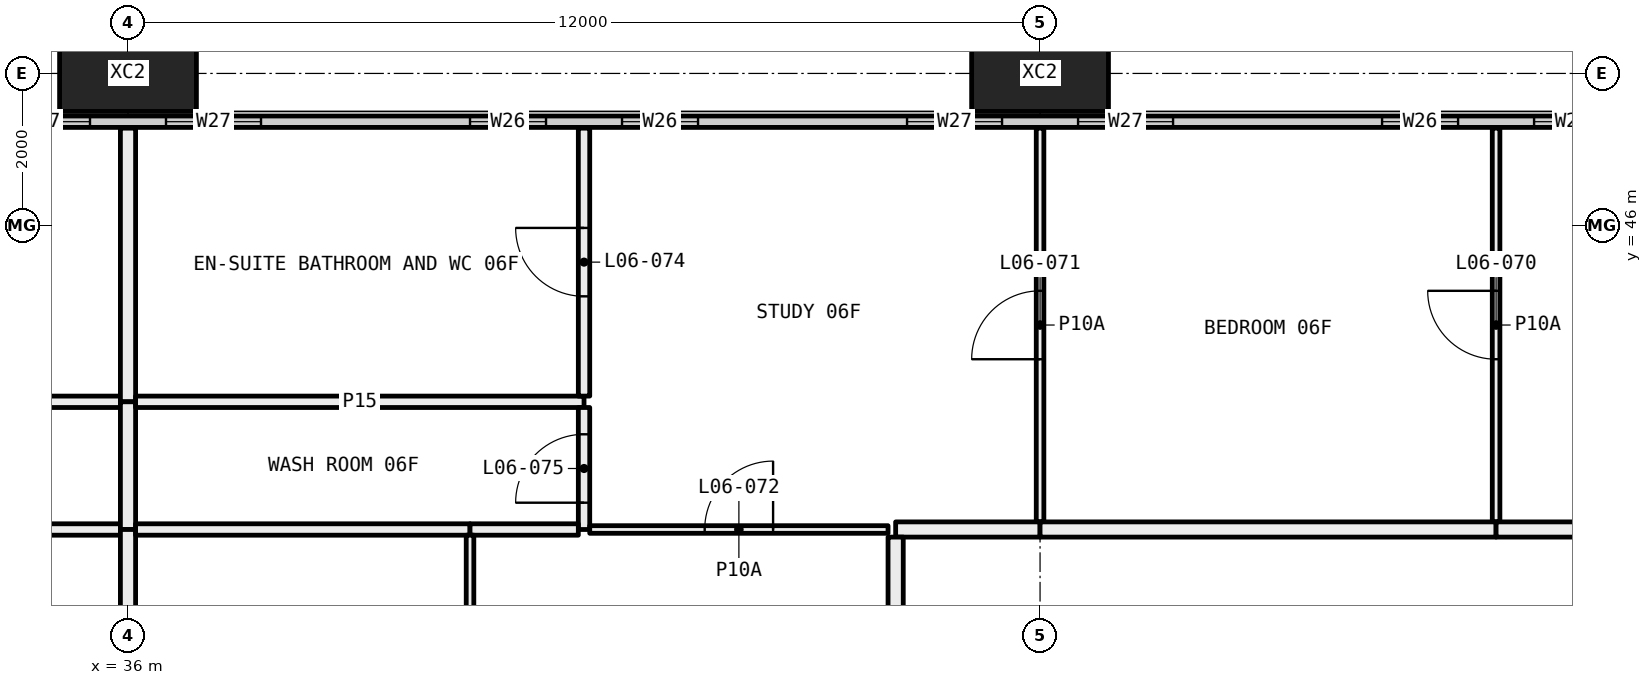
"""IFC4 building model, lengths in metres.
Left out: names, types, materials, properties, quantities, classifications, styles, units other than length and angle.
Written with IfcOpenShell. Run it as: python <this file> out.ifc"""

import sys

from ifc_helpers import new_model, si_unit, direction, frame, frame_2d, origin, origin_2d, place, context, subcontext, project, spatial, rectangle, hollow_rectangle, extrude, element, fill, save


model = new_model("IFC4")
c1 = context("Model", 3, precision=1e-05, world=origin(), true_north=direction((0.0, 1.0)))
c2 = subcontext(c1, "Body", "Model", "MODEL_VIEW")
j1 = project(units=[si_unit("LENGTHUNIT", "METRE"), si_unit("PLANEANGLEUNIT", "RADIAN")], contexts=[c1])
p1 = place(None, origin())
s1 = spatial("IfcSite", under=j1, at=p1, CompositionType="ELEMENT")
p2 = place(p1, origin())
s2 = spatial("IfcBuilding", under=s1, at=p2, CompositionType="ELEMENT")
p3 = place(p2, frame((0.0, 0.0, 33.45)))
s3 = spatial("IfcBuildingStorey", under=s2, at=p3, CompositionType="ELEMENT", Elevation=33.45)
for number, where, z_axis, x_axis in (
    (1, (36.0, 48.0, -0.4), (0.0, 0.0, 1.0), (1.0, 0.0, 0.0)),
    (2, (48.0, 48.0, -0.4), (0.0, 0.0, 1.0), (1.0, 0.0, 0.0)),
):
    element("IfcColumn", number, at=place(p3, frame(where, z_axis=z_axis, x_axis=x_axis)), inside=s3, PredefinedType="COLUMN", context=c2, shape_type="SweptSolid", body=[
        extrude(hollow_rectangle(XDim=1.8, YDim=1.0, WallThickness=0.07, at=origin_2d()), origin(), (0.0, 0.0, 1.0), 3.45),
    ])
p4 = place(p3, frame((6.56, 47.365, 0.0), z_axis=(0.0, 0.0, 1.0), x_axis=(1.0, 0.0, 0.0)))
e3 = element("IfcWall", 3, at=p4, inside=s3, PredefinedType="ELEMENTEDWALL", context=c2, shape_type="SweptSolid", body=[
    extrude(rectangle(XDim=58.88, YDim=0.15, at=frame_2d((29.44, 0.0))), origin(), (0.0, 0.0, 1.0), 3.05),
])
p5 = place(p4, frame((0.44, 0.0, 0.45)))
e4 = element("IfcOpeningElement", 4, at=p5, cuts=e3, PredefinedType="OPENING", context=c2, shape_type="SweptSolid", body=[
    extrude(rectangle(XDim=4.5, YDim=2.55, at=frame_2d((2.25, 1.275))), frame((0.0, 0.085, 0.0), z_axis=(0.0, -1.0, 0.0), x_axis=(1.0, 0.0, 0.0)), (0.0, 0.0, 1.0), 0.17),
])
p6 = place(p4, frame((5.94, 0.0, 0.45)))
e5 = element("IfcOpeningElement", 5, at=p6, cuts=e3, PredefinedType="OPENING", context=c2, shape_type="SweptSolid", body=[
    extrude(rectangle(XDim=1.25, YDim=2.55, at=frame_2d((0.625, 1.275))), frame((0.0, 0.085, 0.0), z_axis=(0.0, -1.0, 0.0), x_axis=(1.0, 0.0, 0.0)), (0.0, 0.0, 1.0), 0.17),
])
p7 = place(p4, frame((9.94, 0.0, 0.45)))
e6 = element("IfcOpeningElement", 6, at=p7, cuts=e3, PredefinedType="OPENING", context=c2, shape_type="SweptSolid", body=[
    extrude(rectangle(XDim=1.0, YDim=2.55, at=frame_2d((0.5, 1.275))), frame((0.0, 0.085, 0.0), z_axis=(0.0, -1.0, 0.0), x_axis=(1.0, 0.0, 0.0)), (0.0, 0.0, 1.0), 0.17),
])
p8 = place(p4, frame((11.94, 0.0, 0.45)))
e7 = element("IfcOpeningElement", 7, at=p8, cuts=e3, PredefinedType="OPENING", context=c2, shape_type="SweptSolid", body=[
    extrude(rectangle(XDim=1.0, YDim=2.55, at=frame_2d((0.5, 1.275))), frame((0.0, 0.085, 0.0), z_axis=(0.0, -1.0, 0.0), x_axis=(1.0, 0.0, 0.0)), (0.0, 0.0, 1.0), 0.17),
])
p9 = place(p4, frame((15.69, 0.0, 0.45)))
e8 = element("IfcOpeningElement", 8, at=p9, cuts=e3, PredefinedType="OPENING", context=c2, shape_type="SweptSolid", body=[
    extrude(rectangle(XDim=1.25, YDim=2.55, at=frame_2d((0.625, 1.275))), frame((0.0, 0.085, 0.0), z_axis=(0.0, -1.0, 0.0), x_axis=(1.0, 0.0, 0.0)), (0.0, 0.0, 1.0), 0.17),
])
p10 = place(p4, frame((17.94, 0.0, 0.45)))
e9 = element("IfcOpeningElement", 9, at=p10, cuts=e3, PredefinedType="OPENING", context=c2, shape_type="SweptSolid", body=[
    extrude(rectangle(XDim=1.25, YDim=2.55, at=frame_2d((0.625, 1.275))), frame((0.0, 0.085, 0.0), z_axis=(0.0, -1.0, 0.0), x_axis=(1.0, 0.0, 0.0)), (0.0, 0.0, 1.0), 0.17),
])
p11 = place(p4, frame((21.94, 0.0, 0.45)))
e10 = element("IfcOpeningElement", 10, at=p11, cuts=e3, PredefinedType="OPENING", context=c2, shape_type="SweptSolid", body=[
    extrude(rectangle(XDim=1.0, YDim=2.55, at=frame_2d((0.5, 1.275))), frame((0.0, 0.085, 0.0), z_axis=(0.0, -1.0, 0.0), x_axis=(1.0, 0.0, 0.0)), (0.0, 0.0, 1.0), 0.17),
])
p12 = place(p4, frame((23.94, 0.0, 0.45)))
e11 = element("IfcOpeningElement", 11, at=p12, cuts=e3, PredefinedType="OPENING", context=c2, shape_type="SweptSolid", body=[
    extrude(rectangle(XDim=1.0, YDim=2.55, at=frame_2d((0.5, 1.275))), frame((0.0, 0.085, 0.0), z_axis=(0.0, -1.0, 0.0), x_axis=(1.0, 0.0, 0.0)), (0.0, 0.0, 1.0), 0.17),
])
p13 = place(p4, frame((27.69, 0.0, 0.45)))
e12 = element("IfcOpeningElement", 12, at=p13, cuts=e3, PredefinedType="OPENING", context=c2, shape_type="SweptSolid", body=[
    extrude(rectangle(XDim=1.25, YDim=2.55, at=frame_2d((0.625, 1.275))), frame((0.0, 0.085, 0.0), z_axis=(0.0, -1.0, 0.0), x_axis=(1.0, 0.0, 0.0)), (0.0, 0.0, 1.0), 0.17),
])
p14 = place(p4, frame((29.94, 0.0, 0.45)))
e13 = element("IfcOpeningElement", 13, at=p14, cuts=e3, PredefinedType="OPENING", context=c2, shape_type="SweptSolid", body=[
    extrude(rectangle(XDim=1.25, YDim=2.55, at=frame_2d((0.625, 1.275))), frame((0.0, 0.085, 0.0), z_axis=(0.0, -1.0, 0.0), x_axis=(1.0, 0.0, 0.0)), (0.0, 0.0, 1.0), 0.17),
])
p15 = place(p4, frame((33.94, 0.0, 0.45)))
e14 = element("IfcOpeningElement", 14, at=p15, cuts=e3, PredefinedType="OPENING", context=c2, shape_type="SweptSolid", body=[
    extrude(rectangle(XDim=1.0, YDim=2.55, at=frame_2d((0.5, 1.275))), frame((0.0, 0.085, 0.0), z_axis=(0.0, -1.0, 0.0), x_axis=(1.0, 0.0, 0.0)), (0.0, 0.0, 1.0), 0.17),
])
p16 = place(p4, frame((35.94, 0.0, 0.45)))
e15 = element("IfcOpeningElement", 15, at=p16, cuts=e3, PredefinedType="OPENING", context=c2, shape_type="SweptSolid", body=[
    extrude(rectangle(XDim=1.0, YDim=2.55, at=frame_2d((0.5, 1.275))), frame((0.0, 0.085, 0.0), z_axis=(0.0, -1.0, 0.0), x_axis=(1.0, 0.0, 0.0)), (0.0, 0.0, 1.0), 0.17),
])
p17 = place(p4, frame((39.69, 0.0, 0.45)))
e16 = element("IfcOpeningElement", 16, at=p17, cuts=e3, PredefinedType="OPENING", context=c2, shape_type="SweptSolid", body=[
    extrude(rectangle(XDim=1.25, YDim=2.55, at=frame_2d((0.625, 1.275))), frame((0.0, 0.085, 0.0), z_axis=(0.0, -1.0, 0.0), x_axis=(1.0, 0.0, 0.0)), (0.0, 0.0, 1.0), 0.17),
])
p18 = place(p4, frame((41.94, 0.0, 0.45)))
e17 = element("IfcOpeningElement", 17, at=p18, cuts=e3, PredefinedType="OPENING", context=c2, shape_type="SweptSolid", body=[
    extrude(rectangle(XDim=1.25, YDim=2.55, at=frame_2d((0.625, 1.275))), frame((0.0, 0.085, 0.0), z_axis=(0.0, -1.0, 0.0), x_axis=(1.0, 0.0, 0.0)), (0.0, 0.0, 1.0), 0.17),
])
p19 = place(p4, frame((45.94, 0.0, 0.45)))
e18 = element("IfcOpeningElement", 18, at=p19, cuts=e3, PredefinedType="OPENING", context=c2, shape_type="SweptSolid", body=[
    extrude(rectangle(XDim=1.0, YDim=2.55, at=frame_2d((0.5, 1.275))), frame((0.0, 0.085, 0.0), z_axis=(0.0, -1.0, 0.0), x_axis=(1.0, 0.0, 0.0)), (0.0, 0.0, 1.0), 0.17),
])
p20 = place(p4, frame((47.94, 0.0, 0.45)))
e19 = element("IfcOpeningElement", 19, at=p20, cuts=e3, PredefinedType="OPENING", context=c2, shape_type="SweptSolid", body=[
    extrude(rectangle(XDim=1.0, YDim=2.55, at=frame_2d((0.5, 1.275))), frame((0.0, 0.085, 0.0), z_axis=(0.0, -1.0, 0.0), x_axis=(1.0, 0.0, 0.0)), (0.0, 0.0, 1.0), 0.17),
])
p21 = place(p4, frame((51.69, 0.0, 0.45)))
e20 = element("IfcOpeningElement", 20, at=p21, cuts=e3, PredefinedType="OPENING", context=c2, shape_type="SweptSolid", body=[
    extrude(rectangle(XDim=1.25, YDim=2.55, at=frame_2d((0.625, 1.275))), frame((0.0, 0.085, 0.0), z_axis=(0.0, -1.0, 0.0), x_axis=(1.0, 0.0, 0.0)), (0.0, 0.0, 1.0), 0.17),
])
p22 = place(p4, frame((53.94, 0.0, 0.45)))
e21 = element("IfcOpeningElement", 21, at=p22, cuts=e3, PredefinedType="OPENING", context=c2, shape_type="SweptSolid", body=[
    extrude(rectangle(XDim=4.5, YDim=2.55, at=frame_2d((2.25, 1.275))), frame((0.0, 0.085, 0.0), z_axis=(0.0, -1.0, 0.0), x_axis=(1.0, 0.0, 0.0)), (0.0, 0.0, 1.0), 0.17),
])
p23 = place(p3, frame((30.075, 43.68, 0.0), z_axis=(0.0, 0.0, 1.0), x_axis=(1.0, 0.0, 0.0)))
e22 = element("IfcWall", 22, at=p23, inside=s3, PredefinedType="PARTITIONING", context=c2, shape_type="SweptSolid", body=[
    extrude(rectangle(XDim=5.825, YDim=0.15, at=frame_2d((2.913, 0.0))), origin(), (0.0, 0.0, 1.0), 3.05),
])
p24 = place(p3, frame((36.0, 43.68, 0.0), z_axis=(0.0, 0.0, 1.0), x_axis=(0.0, 1.0, 0.0)))
e23 = element("IfcWall", 23, at=p24, inside=s3, PredefinedType="PARTITIONING", context=c2, shape_type="SweptSolid", body=[
    extrude(rectangle(XDim=3.6, YDim=0.2, at=frame_2d((1.8, 0.0))), origin(), (0.0, 0.0, 1.0), 2.45),
])
p25 = place(p3, frame((31.5, 42.0, 0.0), z_axis=(0.0, 0.0, 1.0), x_axis=(1.0, 0.0, 0.0)))
e24 = element("IfcWall", 24, at=p25, inside=s3, PredefinedType="PARTITIONING", context=c2, shape_type="SweptSolid", body=[
    extrude(rectangle(XDim=4.4, YDim=0.15, at=frame_2d((2.2, 0.0))), origin(), (0.0, 0.0, 1.0), 3.05),
])
p26 = place(p3, frame((36.0, 42.0, 0.0), z_axis=(0.0, 0.0, 1.0), x_axis=(0.0, 1.0, 0.0)))
e25 = element("IfcWall", 25, at=p26, inside=s3, PredefinedType="PARTITIONING", context=c2, shape_type="SweptSolid", body=[
    extrude(rectangle(XDim=1.68, YDim=0.2, at=frame_2d((0.84, 0.0))), origin(), (0.0, 0.0, 1.0), 2.45),
])
p27 = place(p3, frame((36.0, 36.8, 0.0), z_axis=(0.0, 0.0, 1.0), x_axis=(0.0, 1.0, 0.0)))
e26 = element("IfcWall", 26, at=p27, inside=s3, PredefinedType="PARTITIONING", context=c2, shape_type="SweptSolid", body=[
    extrude(rectangle(XDim=5.2, YDim=0.2, at=frame_2d((2.6, 0.0))), origin(), (0.0, 0.0, 1.0), 2.45),
])
p28 = place(p3, frame((36.1, 43.68, 0.0), z_axis=(0.0, 0.0, 1.0), x_axis=(1.0, 0.0, 0.0)))
e27 = element("IfcWall", 27, at=p28, inside=s3, PredefinedType="PARTITIONING", context=c2, shape_type="SweptSolid", body=[
    extrude(rectangle(XDim=5.9, YDim=0.15, at=frame_2d((2.95, 0.0))), origin(), (0.0, 0.0, 1.0), 3.05),
])
p29 = place(p3, frame((42.0, 43.755, 0.0), z_axis=(0.0, 0.0, 1.0), x_axis=(0.0, 1.0, 0.0)))
e28 = element("IfcWall", 28, at=p29, inside=s3, PredefinedType="PARTITIONING", context=c2, shape_type="SweptSolid", body=[
    extrude(rectangle(XDim=3.525, YDim=0.15, at=frame_2d((1.763, 0.0))), origin(), (0.0, 0.0, 1.0), 3.05),
])
p30 = place(p29, frame((1.312, 0.0, 0.0)))
e29 = element("IfcOpeningElement", 29, at=p30, cuts=e28, PredefinedType="OPENING", context=c2, shape_type="SweptSolid", body=[
    extrude(rectangle(XDim=0.9, YDim=2.1, at=frame_2d((0.45, 1.05))), frame((0.0, 0.085, 0.0), z_axis=(0.0, -1.0, 0.0), x_axis=(1.0, 0.0, 0.0)), (0.0, 0.0, 1.0), 0.17),
])
p31 = place(p3, frame((42.0, 42.0, 0.0), z_axis=(0.0, 0.0, 1.0), x_axis=(0.0, 1.0, 0.0)))
e30 = element("IfcWall", 30, at=p31, inside=s3, PredefinedType="PARTITIONING", context=c2, shape_type="SweptSolid", body=[
    extrude(rectangle(XDim=1.605, YDim=0.15, at=frame_2d((0.802, 0.0))), origin(), (0.0, 0.0, 1.0), 3.05),
])
p32 = place(p31, frame((0.353, 0.0, 0.0)))
e31 = element("IfcOpeningElement", 31, at=p32, cuts=e30, PredefinedType="OPENING", context=c2, shape_type="SweptSolid", body=[
    extrude(rectangle(XDim=0.9, YDim=2.1, at=frame_2d((0.45, 1.05))), frame((0.0, 0.085, 0.0), z_axis=(0.0, -1.0, 0.0), x_axis=(1.0, 0.0, 0.0)), (0.0, 0.0, 1.0), 0.17),
])
p33 = place(p3, frame((36.1, 42.0, 0.0), z_axis=(0.0, 0.0, 1.0), x_axis=(1.0, 0.0, 0.0)))
e32 = element("IfcWall", 32, at=p33, inside=s3, PredefinedType="PARTITIONING", context=c2, shape_type="SweptSolid", body=[
    extrude(rectangle(XDim=4.4, YDim=0.15, at=frame_2d((2.2, 0.0))), origin(), (0.0, 0.0, 1.0), 3.05),
])
p34 = place(p3, frame((40.5, 42.0, 0.0), z_axis=(0.0, 0.0, 1.0), x_axis=(1.0, 0.0, 0.0)))
e33 = element("IfcWall", 33, at=p34, inside=s3, PredefinedType="PARTITIONING", context=c2, shape_type="SweptSolid", body=[
    extrude(rectangle(XDim=1.425, YDim=0.15, at=frame_2d((0.712, 0.0))), origin(), (0.0, 0.0, 1.0), 3.05),
])
p35 = place(p3, frame((48.0, 42.1, 0.0), z_axis=(0.0, 0.0, 1.0), x_axis=(0.0, 1.0, 0.0)))
e34 = element("IfcWall", 34, at=p35, inside=s3, PredefinedType="PARTITIONING", context=c2, shape_type="SweptSolid", body=[
    extrude(rectangle(XDim=5.18, YDim=0.1, at=frame_2d((2.59, 0.0))), origin(), (0.0, 0.0, 1.0), 3.05),
])
p36 = place(p35, frame((2.14, 0.0, 0.0)))
e35 = element("IfcOpeningElement", 35, at=p36, cuts=e34, PredefinedType="OPENING", context=c2, shape_type="SweptSolid", body=[
    extrude(rectangle(XDim=0.9, YDim=2.1, at=frame_2d((0.45, 1.05))), frame((0.0, 0.06, 0.0), z_axis=(0.0, -1.0, 0.0), x_axis=(1.0, 0.0, 0.0)), (0.0, 0.0, 1.0), 0.12),
])
p37 = place(p3, frame((42.075, 42.0, 0.0), z_axis=(0.0, 0.0, 1.0), x_axis=(1.0, 0.0, 0.0)))
e36 = element("IfcWall", 36, at=p37, inside=s3, PredefinedType="PARTITIONING", context=c2, shape_type="SweptSolid", body=[
    extrude(rectangle(XDim=3.925, YDim=0.1, at=frame_2d((1.962, 0.0))), origin(), (0.0, 0.0, 1.0), 3.05),
])
p38 = place(p37, frame((1.512, 0.0, 0.0)))
e37 = element("IfcOpeningElement", 37, at=p38, cuts=e36, PredefinedType="OPENING", context=c2, shape_type="SweptSolid", body=[
    extrude(rectangle(XDim=0.9, YDim=2.1, at=frame_2d((0.45, 1.05))), frame((0.0, 0.06, 0.0), z_axis=(0.0, -1.0, 0.0), x_axis=(1.0, 0.0, 0.0)), (0.0, 0.0, 1.0), 0.12),
])
p39 = place(p3, frame((46.1, 42.0, 0.0), z_axis=(0.0, 0.0, 1.0), x_axis=(1.0, 0.0, 0.0)))
e38 = element("IfcWall", 38, at=p39, inside=s3, PredefinedType="PARTITIONING", context=c2, shape_type="SweptSolid", body=[
    extrude(rectangle(XDim=1.9, YDim=0.2, at=frame_2d((0.95, 0.0))), origin(), (0.0, 0.0, 1.0), 3.05),
])
p40 = place(p3, frame((54.0, 42.1, 0.0), z_axis=(0.0, 0.0, 1.0), x_axis=(0.0, 1.0, 0.0)))
e39 = element("IfcWall", 39, at=p40, inside=s3, PredefinedType="PARTITIONING", context=c2, shape_type="SweptSolid", body=[
    extrude(rectangle(XDim=5.18, YDim=0.1, at=frame_2d((2.59, 0.0))), origin(), (0.0, 0.0, 1.0), 3.05),
])
p41 = place(p40, frame((2.14, 0.0, 0.0)))
e40 = element("IfcOpeningElement", 40, at=p41, cuts=e39, PredefinedType="OPENING", context=c2, shape_type="SweptSolid", body=[
    extrude(rectangle(XDim=0.9, YDim=2.1, at=frame_2d((0.45, 1.05))), frame((0.0, 0.06, 0.0), z_axis=(0.0, -1.0, 0.0), x_axis=(1.0, 0.0, 0.0)), (0.0, 0.0, 1.0), 0.12),
])
p42 = place(p3, frame((48.0, 42.0, 0.0), z_axis=(0.0, 0.0, 1.0), x_axis=(1.0, 0.0, 0.0)))
e41 = element("IfcWall", 41, at=p42, inside=s3, PredefinedType="PARTITIONING", context=c2, shape_type="SweptSolid", body=[
    extrude(rectangle(XDim=6.0, YDim=0.2, at=frame_2d((3.0, 0.0))), origin(), (0.0, 0.0, 1.0), 3.05),
])
p43 = place(p3, frame((54.0, 42.0, 0.0), z_axis=(0.0, 0.0, 1.0), x_axis=(1.0, 0.0, 0.0)))
e42 = element("IfcWall", 42, at=p43, inside=s3, PredefinedType="PARTITIONING", context=c2, shape_type="SweptSolid", body=[
    extrude(rectangle(XDim=6.0, YDim=0.2, at=frame_2d((3.0, 0.0))), origin(), (0.0, 0.0, 1.0), 3.05),
])
p44 = place(p43, frame((2.5, 0.0, 0.0)))
e43 = element("IfcOpeningElement", 43, at=p44, cuts=e42, PredefinedType="OPENING", context=c2, shape_type="SweptSolid", body=[
    extrude(rectangle(XDim=1.0, YDim=2.1, at=frame_2d((0.5, 1.05))), frame((0.0, 0.11, 0.0), z_axis=(0.0, -1.0, 0.0), x_axis=(1.0, 0.0, 0.0)), (0.0, 0.0, 1.0), 0.22),
])
p45 = place(p3, frame((40.5, 36.1, 0.0), z_axis=(0.0, 0.0, 1.0), x_axis=(0.0, 1.0, 0.0)))
e44 = element("IfcWall", 44, at=p45, inside=s3, PredefinedType="PARTITIONING", context=c2, shape_type="SweptSolid", body=[
    extrude(rectangle(XDim=5.825, YDim=0.1, at=frame_2d((2.913, 0.0))), origin(), (0.0, 0.0, 1.0), 3.05),
])
p46 = place(p45, frame((2.462, 0.0, 0.0)))
e45 = element("IfcOpeningElement", 45, at=p46, cuts=e44, PredefinedType="OPENING", context=c2, shape_type="SweptSolid", body=[
    extrude(rectangle(XDim=0.9, YDim=2.1, at=frame_2d((0.45, 1.05))), frame((0.0, 0.06, 0.0), z_axis=(0.0, -1.0, 0.0), x_axis=(1.0, 0.0, 0.0)), (0.0, 0.0, 1.0), 0.12),
])
p47 = place(p3, frame((46.1, 36.1, 0.0), z_axis=(0.0, 0.0, 1.0), x_axis=(0.0, 1.0, 0.0)))
e46 = element("IfcWall", 46, at=p47, inside=s3, PredefinedType="PARTITIONING", context=c2, shape_type="SweptSolid", body=[
    extrude(rectangle(XDim=5.8, YDim=0.2, at=frame_2d((2.9, 0.0))), origin(), (0.0, 0.0, 1.0), 3.05),
])
p48 = place(p13, origin())
e47 = element("IfcWindow", 47, at=p48, inside=s3, PartitioningType="SINGLE_PANEL", PredefinedType="WINDOW", context=c2, shape_type="SweptSolid", body=[
    extrude(rectangle(XDim=1.25, YDim=2.55, at=frame_2d((0.625, 1.275))), frame((0.0, 0.03, 0.0), z_axis=(0.0, -1.0, 0.0), x_axis=(1.0, 0.0, 0.0)), (0.0, 0.0, 1.0), 0.06),
])
fill(e12, e47)
p49 = place(p14, origin())
e48 = element("IfcWindow", 48, at=p49, inside=s3, PartitioningType="SINGLE_PANEL", PredefinedType="WINDOW", context=c2, shape_type="SweptSolid", body=[
    extrude(rectangle(XDim=1.25, YDim=2.55, at=frame_2d((0.625, 1.275))), frame((0.0, 0.03, 0.0), z_axis=(0.0, -1.0, 0.0), x_axis=(1.0, 0.0, 0.0)), (0.0, 0.0, 1.0), 0.06),
])
fill(e13, e48)
p50 = place(p15, origin())
e49 = element("IfcWindow", 49, at=p50, inside=s3, PartitioningType="SINGLE_PANEL", PredefinedType="WINDOW", context=c2, shape_type="SweptSolid", body=[
    extrude(rectangle(XDim=1.0, YDim=2.55, at=frame_2d((0.5, 1.275))), frame((0.0, 0.03, 0.0), z_axis=(0.0, -1.0, 0.0), x_axis=(1.0, 0.0, 0.0)), (0.0, 0.0, 1.0), 0.06),
])
fill(e14, e49)
p51 = place(p16, origin())
e50 = element("IfcWindow", 50, at=p51, inside=s3, PartitioningType="SINGLE_PANEL", PredefinedType="WINDOW", context=c2, shape_type="SweptSolid", body=[
    extrude(rectangle(XDim=1.0, YDim=2.55, at=frame_2d((0.5, 1.275))), frame((0.0, 0.03, 0.0), z_axis=(0.0, -1.0, 0.0), x_axis=(1.0, 0.0, 0.0)), (0.0, 0.0, 1.0), 0.06),
])
fill(e15, e50)
p52 = place(p17, origin())
e51 = element("IfcWindow", 51, at=p52, inside=s3, PartitioningType="SINGLE_PANEL", PredefinedType="WINDOW", context=c2, shape_type="SweptSolid", body=[
    extrude(rectangle(XDim=1.25, YDim=2.55, at=frame_2d((0.625, 1.275))), frame((0.0, 0.03, 0.0), z_axis=(0.0, -1.0, 0.0), x_axis=(1.0, 0.0, 0.0)), (0.0, 0.0, 1.0), 0.06),
])
fill(e16, e51)
p53 = place(p18, origin())
e52 = element("IfcWindow", 52, at=p53, inside=s3, PartitioningType="SINGLE_PANEL", PredefinedType="WINDOW", context=c2, shape_type="SweptSolid", body=[
    extrude(rectangle(XDim=1.25, YDim=2.55, at=frame_2d((0.625, 1.275))), frame((0.0, 0.03, 0.0), z_axis=(0.0, -1.0, 0.0), x_axis=(1.0, 0.0, 0.0)), (0.0, 0.0, 1.0), 0.06),
])
fill(e17, e52)
p54 = place(p19, origin())
e53 = element("IfcWindow", 53, at=p54, inside=s3, PartitioningType="SINGLE_PANEL", PredefinedType="WINDOW", context=c2, shape_type="SweptSolid", body=[
    extrude(rectangle(XDim=1.0, YDim=2.55, at=frame_2d((0.5, 1.275))), frame((0.0, 0.03, 0.0), z_axis=(0.0, -1.0, 0.0), x_axis=(1.0, 0.0, 0.0)), (0.0, 0.0, 1.0), 0.06),
])
fill(e18, e53)
p55 = place(p20, origin())
e54 = element("IfcWindow", 54, at=p55, inside=s3, PartitioningType="SINGLE_PANEL", PredefinedType="WINDOW", context=c2, shape_type="SweptSolid", body=[
    extrude(rectangle(XDim=1.0, YDim=2.55, at=frame_2d((0.5, 1.275))), frame((0.0, 0.03, 0.0), z_axis=(0.0, -1.0, 0.0), x_axis=(1.0, 0.0, 0.0)), (0.0, 0.0, 1.0), 0.06),
])
fill(e19, e54)
p56 = place(p41, origin())
e55 = element("IfcDoor", 55, at=p56, inside=s3, OperationType="SINGLE_SWING_LEFT", PredefinedType="DOOR", context=c2, shape_type="SweptSolid", body=[
    extrude(rectangle(XDim=0.9, YDim=2.1, at=frame_2d((0.45, 1.05))), frame((0.0, 0.025, 0.0), z_axis=(0.0, -1.0, 0.0), x_axis=(1.0, 0.0, 0.0)), (0.0, 0.0, 1.0), 0.05),
])
fill(e40, e55)
p57 = place(p36, origin())
e56 = element("IfcDoor", 56, at=p57, inside=s3, OperationType="SINGLE_SWING_RIGHT", PredefinedType="DOOR", context=c2, shape_type="SweptSolid", body=[
    extrude(rectangle(XDim=0.9, YDim=2.1, at=frame_2d((0.45, 1.05))), frame((0.0, 0.025, 0.0), z_axis=(0.0, -1.0, 0.0), x_axis=(1.0, 0.0, 0.0)), (0.0, 0.0, 1.0), 0.05),
])
fill(e35, e56)
p58 = place(p38, origin())
e57 = element("IfcDoor", 57, at=p58, inside=s3, OperationType="SINGLE_SWING_LEFT", PredefinedType="DOOR", context=c2, shape_type="SweptSolid", body=[
    extrude(rectangle(XDim=0.9, YDim=2.1, at=frame_2d((0.45, 1.05))), frame((0.0, 0.025, 0.0), z_axis=(0.0, -1.0, 0.0), x_axis=(1.0, 0.0, 0.0)), (0.0, 0.0, 1.0), 0.05),
])
fill(e37, e57)
p59 = place(p30, origin())
e58 = element("IfcDoor", 58, at=p59, inside=s3, OperationType="SINGLE_SWING_LEFT", PredefinedType="DOOR", context=c2, shape_type="SweptSolid", body=[
    extrude(rectangle(XDim=0.9, YDim=2.1, at=frame_2d((0.45, 1.05))), frame((0.0, 0.025, 0.0), z_axis=(0.0, -1.0, 0.0), x_axis=(1.0, 0.0, 0.0)), (0.0, 0.0, 1.0), 0.05),
])
fill(e29, e58)
p60 = place(p32, origin())
e59 = element("IfcDoor", 59, at=p60, inside=s3, OperationType="SINGLE_SWING_RIGHT", PredefinedType="DOOR", context=c2, shape_type="SweptSolid", body=[
    extrude(rectangle(XDim=0.9, YDim=2.1, at=frame_2d((0.45, 1.05))), frame((0.0, 0.025, 0.0), z_axis=(0.0, -1.0, 0.0), x_axis=(1.0, 0.0, 0.0)), (0.0, 0.0, 1.0), 0.05),
])
fill(e31, e59)
save(model, sys.argv[1])
